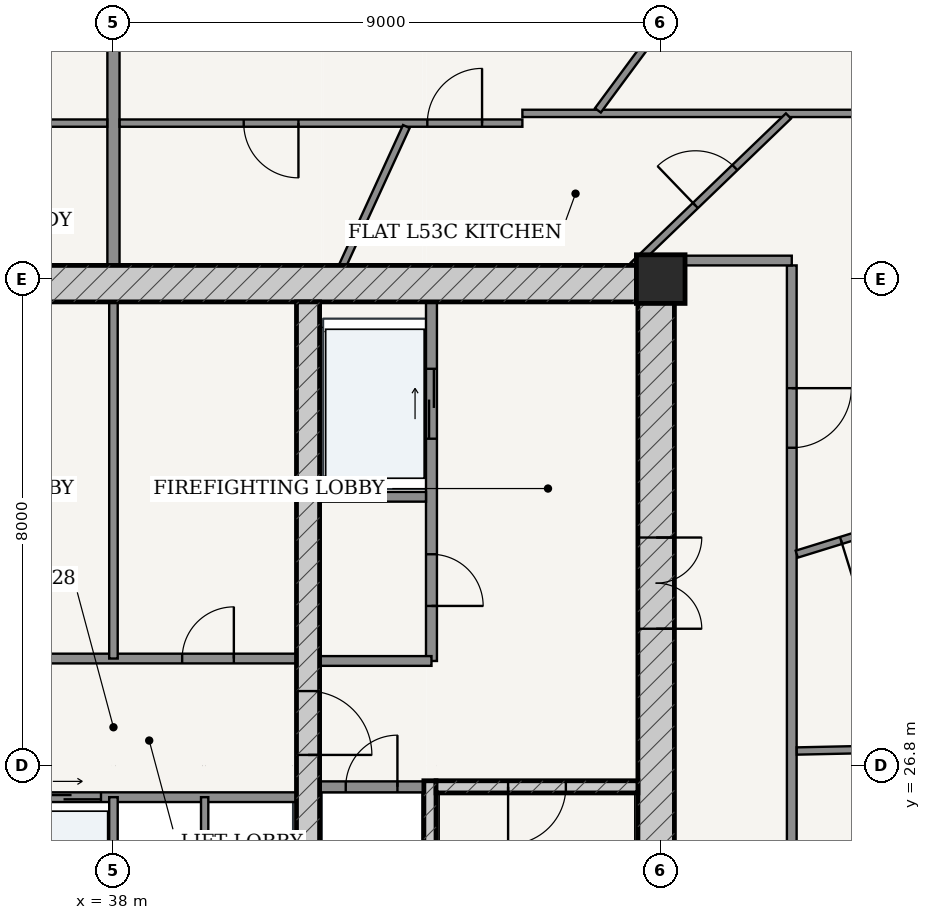
"""IFC4 building model, lengths in metres.
Left out: names, types, materials, properties, quantities, classifications, styles, units other than length and angle.
Written with IfcOpenShell. Run it as: python <this file> out.ifc"""

import sys

from ifc_helpers import new_model, si_unit, direction, frame, frame_2d, origin, origin_2d, place, context, subcontext, project, spatial, rectangle, extrude, source, transform, mapped, element, fill, save


model = new_model("IFC4")
c1 = context("Model", 3, precision=1e-05, world=origin(), true_north=direction((-0.2419218956, 0.970295726276)))
c2 = subcontext(c1, "Body", "Model", "MODEL_VIEW")
j1 = project(units=[si_unit("LENGTHUNIT", "METRE"), si_unit("PLANEANGLEUNIT", "RADIAN")], contexts=[c1])
p1 = place(None, origin())
s1 = spatial("IfcSite", under=j1, at=p1, CompositionType="ELEMENT")
p2 = place(p1, origin())
s2 = spatial("IfcBuilding", under=s1, at=p2, CompositionType="ELEMENT")
p3 = place(p2, frame((0.0, 0.0, 202.3)))
s3 = spatial("IfcBuildingStorey", under=s2, at=p3, CompositionType="ELEMENT", Elevation=202.3)
p4 = place(p3, frame((47.0, 34.8, 0.0), z_axis=(0.0, 0.0, 1.0), x_axis=(1.0, 0.0, 0.0)))
e1 = element("IfcColumn", 1, at=p4, inside=s3, PredefinedType="COLUMN", context=c2, shape_type="SweptSolid", body=[
    extrude(rectangle(XDim=0.8, YDim=0.8, at=origin_2d()), origin(), (0.0, 0.0, 1.0), 3.7),
])
p5 = place(p3, frame((28.775, 34.725, 0.0), z_axis=(0.0, 0.0, 1.0), x_axis=(1.0, 0.0, 0.0)))
e2 = element("IfcWall", 2, at=p5, inside=s3, PredefinedType="SHEAR", context=c2, shape_type="SweptSolid", body=[
    extrude(rectangle(XDim=18.45, YDim=0.6, at=frame_2d((9.225, 0.0))), origin(), (0.0, 0.0, 1.0), 3.435),
])
p6 = place(p3, frame((46.925, 19.175, 0.0), z_axis=(0.0, 0.0, 1.0), x_axis=(0.0, 1.0, 0.0)))
e3 = element("IfcWall", 3, at=p6, inside=s3, PredefinedType="SHEAR", context=c2, shape_type="SweptSolid", body=[
    extrude(rectangle(XDim=15.25, YDim=0.6, at=frame_2d((7.625, 0.0))), origin(), (0.0, 0.0, 1.0), 3.435),
])
p7 = place(p6, frame((9.875, 0.0, 0.0)))
e4 = element("IfcOpeningElement", 4, at=p7, cuts=e3, PredefinedType="OPENING", context=c2, shape_type="SweptSolid", body=[
    extrude(rectangle(XDim=1.5, YDim=2.2, at=frame_2d((0.75, 1.1))), frame((0.0, 0.31, 0.0), z_axis=(0.0, -1.0, 0.0), x_axis=(1.0, 0.0, 0.0)), (0.0, 0.0, 1.0), 0.62),
])
p8 = place(p3, frame((43.205, 19.175, 0.0), z_axis=(0.0, 0.0, 1.0), x_axis=(0.0, 1.0, 0.0)))
e5 = element("IfcWall", 5, at=p8, inside=s3, PredefinedType="SOLIDWALL", context=c2, shape_type="SweptSolid", body=[
    extrude(rectangle(XDim=7.375, YDim=0.2, at=frame_2d((3.688, 0.0))), origin(), (0.0, 0.0, 1.0), 3.435),
])
p9 = place(p3, frame((43.305, 26.45, 0.0), z_axis=(0.0, 0.0, 1.0), x_axis=(1.0, 0.0, 0.0)))
e6 = element("IfcWall", 6, at=p9, inside=s3, PredefinedType="SOLIDWALL", context=c2, shape_type="SweptSolid", body=[
    extrude(rectangle(XDim=3.32, YDim=0.2, at=frame_2d((1.66, 0.0))), origin(), (0.0, 0.0, 1.0), 3.435),
])
p10 = place(p9, frame((1.185, 0.0, 0.0)))
e7 = element("IfcOpeningElement", 7, at=p10, cuts=e6, PredefinedType="OPENING", context=c2, shape_type="SweptSolid", body=[
    extrude(rectangle(XDim=0.95, YDim=2.15, at=frame_2d((0.475, 1.075))), frame((0.0, 0.11, 0.0), z_axis=(0.0, -1.0, 0.0), x_axis=(1.0, 0.0, 0.0)), (0.0, 0.0, 1.0), 0.22),
])
p11 = place(p3, frame((41.2, 19.175, 0.0), z_axis=(0.0, 0.0, 1.0), x_axis=(0.0, 1.0, 0.0)))
e8 = element("IfcWall", 8, at=p11, inside=s3, PredefinedType="SHEAR", context=c2, shape_type="SweptSolid", body=[
    extrude(rectangle(XDim=15.25, YDim=0.38, at=frame_2d((7.625, 0.0))), origin(), (0.0, 0.0, 1.0), 3.435),
])
p12 = place(p11, frame((7.8, 0.0, 0.0)))
e9 = element("IfcOpeningElement", 9, at=p12, cuts=e8, PredefinedType="OPENING", context=c2, shape_type="SweptSolid", body=[
    extrude(rectangle(XDim=1.05, YDim=2.15, at=frame_2d((0.525, 1.075))), frame((0.0, 0.2, 0.0), z_axis=(0.0, -1.0, 0.0), x_axis=(1.0, 0.0, 0.0)), (0.0, 0.0, 1.0), 0.4),
])
p13 = place(p3, frame((41.39, 26.45, 0.0), z_axis=(0.0, 0.0, 1.0), x_axis=(1.0, 0.0, 0.0)))
e10 = element("IfcWall", 10, at=p13, inside=s3, PredefinedType="PARTITIONING", context=c2, shape_type="SweptSolid", body=[
    extrude(rectangle(XDim=1.71, YDim=0.18, at=frame_2d((0.855, 0.0))), origin(), (0.0, 0.0, 1.0), 3.435),
])
p14 = place(p13, frame((0.43, 0.0, 0.0)))
e11 = element("IfcOpeningElement", 11, at=p14, cuts=e10, PredefinedType="OPENING", context=c2, shape_type="SweptSolid", body=[
    extrude(rectangle(XDim=0.85, YDim=2.1, at=frame_2d((0.425, 1.05))), frame((0.0, 0.1, 0.0), z_axis=(0.0, -1.0, 0.0), x_axis=(1.0, 0.0, 0.0)), (0.0, 0.0, 1.0), 0.2),
])
p15 = place(p3, frame((43.23, 28.52, 0.0), z_axis=(0.0, 0.0, 1.0), x_axis=(0.0, 1.0, 0.0)))
e12 = element("IfcWall", 12, at=p15, inside=s3, PredefinedType="PARTITIONING", context=c2, shape_type="SweptSolid", body=[
    extrude(rectangle(XDim=5.905, YDim=0.18, at=frame_2d((2.953, 0.0))), origin(), (0.0, 0.0, 1.0), 3.435),
])
p16 = place(p15, frame((0.905, 0.0, 0.0)))
e13 = element("IfcOpeningElement", 13, at=p16, cuts=e12, PredefinedType="OPENING", context=c2, shape_type="SweptSolid", body=[
    extrude(rectangle(XDim=0.85, YDim=2.1, at=frame_2d((0.425, 1.05))), frame((0.0, 0.1, 0.0), z_axis=(0.0, -1.0, 0.0), x_axis=(1.0, 0.0, 0.0)), (0.0, 0.0, 1.0), 0.2),
])
p17 = place(p15, frame((3.655, 0.0, 0.0)))
e14 = element("IfcOpeningElement", 14, at=p17, cuts=e12, PredefinedType="OPENING", context=c2, shape_type="SweptSolid", body=[
    extrude(rectangle(XDim=1.15, YDim=2.2, at=frame_2d((0.575, 1.1))), frame((0.0, 0.1, 0.0), z_axis=(0.0, -1.0, 0.0), x_axis=(1.0, 0.0, 0.0)), (0.0, 0.0, 1.0), 0.2),
])
p18 = place(p3, frame((41.39, 31.22, 0.0), z_axis=(0.0, 0.0, 1.0), x_axis=(1.0, 0.0, 0.0)))
e15 = element("IfcWall", 15, at=p18, inside=s3, PredefinedType="PARTITIONING", context=c2, shape_type="SweptSolid", body=[
    extrude(rectangle(XDim=1.75, YDim=0.16, at=frame_2d((0.875, 0.0))), origin(), (0.0, 0.0, 1.0), 3.435),
])
p19 = place(p3, frame((41.39, 28.52, 0.0), z_axis=(0.0, 0.0, 1.0), x_axis=(1.0, 0.0, 0.0)))
e16 = element("IfcWall", 16, at=p19, inside=s3, PredefinedType="PARTITIONING", context=c2, shape_type="SweptSolid", body=[
    extrude(rectangle(XDim=1.84, YDim=0.16, at=frame_2d((0.92, 0.0))), origin(), (0.0, 0.0, 1.0), 3.435),
])
p20 = place(p3, frame((34.99, 28.56, 0.0), z_axis=(0.0, 0.0, 1.0), x_axis=(1.0, 0.0, 0.0)))
e17 = element("IfcWall", 17, at=p20, inside=s3, PredefinedType="PARTITIONING", context=c2, shape_type="SweptSolid", body=[
    extrude(rectangle(XDim=6.02, YDim=0.16, at=frame_2d((3.01, 0.0))), origin(), (0.0, 0.0, 1.0), 3.435),
])
p21 = place(p20, frame((1.025, 0.0, 0.0)))
e18 = element("IfcOpeningElement", 18, at=p21, cuts=e17, PredefinedType="OPENING", context=c2, shape_type="SweptSolid", body=[
    extrude(rectangle(XDim=0.86, YDim=2.1, at=frame_2d((0.43, 1.05))), frame((0.0, 0.09, 0.0), z_axis=(0.0, -1.0, 0.0), x_axis=(1.0, 0.0, 0.0)), (0.0, 0.0, 1.0), 0.18),
])
p22 = place(p20, frame((4.14, 0.0, 0.0)))
e19 = element("IfcOpeningElement", 19, at=p22, cuts=e17, PredefinedType="OPENING", context=c2, shape_type="SweptSolid", body=[
    extrude(rectangle(XDim=0.85, YDim=2.1, at=frame_2d((0.425, 1.05))), frame((0.0, 0.09, 0.0), z_axis=(0.0, -1.0, 0.0), x_axis=(1.0, 0.0, 0.0)), (0.0, 0.0, 1.0), 0.18),
])
p23 = place(p3, frame((38.0, 28.56, 0.0), z_axis=(0.0, 0.0, 1.0), x_axis=(0.0, 1.0, 0.0)))
e20 = element("IfcWall", 20, at=p23, inside=s3, PredefinedType="PARTITIONING", context=c2, shape_type="SweptSolid", body=[
    extrude(rectangle(XDim=5.865, YDim=0.14, at=frame_2d((2.933, 0.0))), origin(), (0.0, 0.0, 1.0), 3.435),
])
p24 = place(p3, frame((34.99, 26.28, 0.0), z_axis=(0.0, 0.0, 1.0), x_axis=(1.0, 0.0, 0.0)))
e21 = element("IfcWall", 21, at=p24, inside=s3, PredefinedType="PARTITIONING", context=c2, shape_type="SweptSolid", body=[
    extrude(rectangle(XDim=6.02, YDim=0.16, at=frame_2d((3.01, 0.0))), origin(), (0.0, 0.0, 1.0), 3.435),
])
p25 = place(p24, frame((0.225, 0.0, 0.0)))
e22 = element("IfcOpeningElement", 22, at=p25, cuts=e21, PredefinedType="OPENING", context=c2, shape_type="SweptSolid", body=[
    extrude(rectangle(XDim=1.1, YDim=2.2, at=frame_2d((0.55, 1.1))), frame((0.0, 0.09, 0.0), z_axis=(0.0, -1.0, 0.0), x_axis=(1.0, 0.0, 0.0)), (0.0, 0.0, 1.0), 0.18),
])
p26 = place(p24, frame((1.705, 0.0, 0.0)))
e23 = element("IfcOpeningElement", 23, at=p26, cuts=e21, PredefinedType="OPENING", context=c2, shape_type="SweptSolid", body=[
    extrude(rectangle(XDim=1.1, YDim=2.2, at=frame_2d((0.55, 1.1))), frame((0.0, 0.09, 0.0), z_axis=(0.0, -1.0, 0.0), x_axis=(1.0, 0.0, 0.0)), (0.0, 0.0, 1.0), 0.18),
])
p27 = place(p3, frame((38.0, 23.72, 0.0), z_axis=(0.0, 0.0, 1.0), x_axis=(0.0, 1.0, 0.0)))
e24 = element("IfcWall", 24, at=p27, inside=s3, PredefinedType="PARTITIONING", context=c2, shape_type="SweptSolid", body=[
    extrude(rectangle(XDim=2.56, YDim=0.14, at=frame_2d((1.28, 0.0))), origin(), (0.0, 0.0, 1.0), 3.435),
])
p28 = place(p3, frame((39.5, 23.72, 0.0), z_axis=(0.0, 0.0, 1.0), x_axis=(0.0, 1.0, 0.0)))
e25 = element("IfcWall", 25, at=p28, inside=s3, PredefinedType="PARTITIONING", context=c2, shape_type="SweptSolid", body=[
    extrude(rectangle(XDim=2.56, YDim=0.12, at=frame_2d((1.28, 0.0))), origin(), (0.0, 0.0, 1.0), 3.435),
])
p29 = place(p3, frame((49.155, 16.725, 0.0), z_axis=(0.0, 0.0, 1.0), x_axis=(0.0, 1.0, 0.0)))
e26 = element("IfcWall", 26, at=p29, inside=s3, PredefinedType="PARTITIONING", context=c2, shape_type="SweptSolid", body=[
    extrude(rectangle(XDim=18.3, YDim=0.16, at=frame_2d((9.15, 0.0))), origin(), (0.0, 0.0, 1.0), 2.951),
])
p30 = place(p29, frame((15.302, 0.0, 0.0)))
e27 = element("IfcOpeningElement", 27, at=p30, cuts=e26, PredefinedType="OPENING", context=c2, shape_type="SweptSolid", body=[
    extrude(rectangle(XDim=0.98, YDim=2.2, at=frame_2d((0.49, 1.1))), frame((0.0, 0.09, 0.0), z_axis=(0.0, -1.0, 0.0), x_axis=(1.0, 0.0, 0.0)), (0.0, 0.0, 1.0), 0.18),
])
p31 = place(p3, frame((47.225, 35.105, 0.0), z_axis=(0.0, 0.0, 1.0), x_axis=(1.0, 0.0, 0.0)))
e28 = element("IfcWall", 28, at=p31, inside=s3, PredefinedType="PARTITIONING", context=c2, shape_type="SweptSolid", body=[
    extrude(rectangle(XDim=1.93, YDim=0.16, at=frame_2d((0.965, 0.0))), origin(), (0.0, 0.0, 1.0), 3.435),
])
p32 = place(p3, frame((38.0, 35.027, 0.0), z_axis=(0.0, 0.0, 1.0), x_axis=(0.0, 1.0, 0.0)))
e29 = element("IfcWall", 29, at=p32, inside=s3, PredefinedType="PARTITIONING", context=c2, shape_type="SweptSolid", body=[
    extrude(rectangle(XDim=11.413, YDim=0.2, at=frame_2d((5.707, 0.0))), origin(), (0.0, 0.0, 1.0), 2.52),
])
p33 = place(p3, frame((31.275, 37.365, 0.0), z_axis=(0.0, 0.0, 1.0), x_axis=(1.0, 0.0, 0.0)))
e30 = element("IfcWall", 30, at=p33, inside=s3, PredefinedType="PARTITIONING", context=c2, shape_type="SweptSolid", body=[
    extrude(rectangle(XDim=6.623, YDim=0.12, at=frame_2d((3.312, 0.0))), origin(), (0.0, 0.0, 1.0), 2.951),
])
p34 = place(p33, frame((4.413, 0.0, 0.0)))
e31 = element("IfcOpeningElement", 31, at=p34, cuts=e30, PredefinedType="OPENING", context=c2, shape_type="SweptSolid", body=[
    extrude(rectangle(XDim=0.86, YDim=2.15, at=frame_2d((0.43, 1.075))), frame((0.0, 0.07, 0.0), z_axis=(0.0, -1.0, 0.0), x_axis=(1.0, 0.0, 0.0)), (0.0, 0.0, 1.0), 0.14),
])
p35 = place(p33, frame((1.328, 0.0, 0.0)))
e32 = element("IfcOpeningElement", 32, at=p35, cuts=e30, PredefinedType="OPENING", context=c2, shape_type="SweptSolid", body=[
    extrude(rectangle(XDim=0.9, YDim=2.15, at=frame_2d((0.45, 1.075))), frame((0.0, 0.07, 0.0), z_axis=(0.0, -1.0, 0.0), x_axis=(1.0, 0.0, 0.0)), (0.0, 0.0, 1.0), 0.14),
])
p36 = place(p3, frame((38.102, 37.365, 0.0), z_axis=(0.0, 0.0, 1.0), x_axis=(1.0, 0.0, 0.0)))
e33 = element("IfcWall", 33, at=p36, inside=s3, PredefinedType="PARTITIONING", context=c2, shape_type="SweptSolid", body=[
    extrude(rectangle(XDim=6.623, YDim=0.12, at=frame_2d((3.312, 0.0))), origin(), (0.0, 0.0, 1.0), 2.951),
])
p37 = place(p36, frame((5.06, 0.0, 0.0)))
e34 = element("IfcOpeningElement", 34, at=p37, cuts=e33, PredefinedType="OPENING", context=c2, shape_type="SweptSolid", body=[
    extrude(rectangle(XDim=0.9, YDim=2.15, at=frame_2d((0.45, 1.075))), frame((0.0, 0.07, 0.0), z_axis=(0.0, -1.0, 0.0), x_axis=(1.0, 0.0, 0.0)), (0.0, 0.0, 1.0), 0.14),
])
p38 = place(p36, frame((2.04, 0.0, 0.0)))
e35 = element("IfcOpeningElement", 35, at=p38, cuts=e33, PredefinedType="OPENING", context=c2, shape_type="SweptSolid", body=[
    extrude(rectangle(XDim=0.9, YDim=2.15, at=frame_2d((0.45, 1.075))), frame((0.0, 0.07, 0.0), z_axis=(0.0, -1.0, 0.0), x_axis=(1.0, 0.0, 0.0)), (0.0, 0.0, 1.0), 0.14),
])
p39 = place(p3, frame((44.725, 37.525, 0.0), z_axis=(0.0, 0.0, 1.0), x_axis=(1.0, 0.0, 0.0)))
e36 = element("IfcWall", 36, at=p39, inside=s3, PredefinedType="PARTITIONING", context=c2, shape_type="SweptSolid", body=[
    extrude(rectangle(XDim=6.85, YDim=0.12, at=frame_2d((3.425, 0.0))), origin(), (0.0, 0.0, 1.0), 2.951),
])
p40 = place(p3, frame((45.967, 37.575, 0.0), z_axis=(0.0, 0.0, 1.0), x_axis=(0.59452500855, 0.804077119565, 0.0)))
e37 = element("IfcWall", 37, at=p40, inside=s3, PredefinedType="PARTITIONING", context=c2, shape_type="SweptSolid", body=[
    extrude(rectangle(XDim=6.867, YDim=0.12, at=frame_2d((3.434, 0.0))), origin(), (0.0, 0.0, 1.0), 2.951),
])
p41 = place(p40, frame((1.975, 0.0, 0.0)))
e38 = element("IfcOpeningElement", 38, at=p41, cuts=e37, PredefinedType="OPENING", context=c2, shape_type="SweptSolid", body=[
    extrude(rectangle(XDim=0.9, YDim=2.15, at=frame_2d((0.45, 1.075))), frame((0.0, 0.07, 0.0), z_axis=(0.0, -1.0, 0.0), x_axis=(1.0, 0.0, 0.0)), (0.0, 0.0, 1.0), 0.14),
])
p42 = place(p3, frame((49.237, 27.039, 0.0), z_axis=(0.0, 0.0, 1.0), x_axis=(0.999772223164, 0.021342487922, 0.0)))
e39 = element("IfcWall", 39, at=p42, inside=s3, PredefinedType="PARTITIONING", context=c2, shape_type="SweptSolid", body=[
    extrude(rectangle(XDim=2.276, YDim=0.12, at=frame_2d((1.138, 0.0))), origin(), (0.0, 0.0, 1.0), 3.435),
])
p43 = place(p3, frame((49.237, 30.277, 0.0), z_axis=(0.0, 0.0, 1.0), x_axis=(0.955326488692, 0.295552533406, 0.0)))
e40 = element("IfcWall", 40, at=p43, inside=s3, PredefinedType="PARTITIONING", context=c2, shape_type="SweptSolid", body=[
    extrude(rectangle(XDim=2.386, YDim=0.12, at=frame_2d((1.193, 0.0))), origin(), (0.0, 0.0, 1.0), 3.435),
])
p44 = place(p43, frame((0.763, 0.0, 0.0)))
e41 = element("IfcOpeningElement", 41, at=p44, cuts=e40, PredefinedType="OPENING", context=c2, shape_type="SweptSolid", body=[
    extrude(rectangle(XDim=0.86, YDim=2.15, at=frame_2d((0.43, 1.075))), frame((0.0, 0.07, 0.0), z_axis=(0.0, -1.0, 0.0), x_axis=(1.0, 0.0, 0.0)), (0.0, 0.0, 1.0), 0.14),
])
p45 = place(p3, frame((46.549, 35.026, 0.0), z_axis=(0.0, 0.0, 1.0), x_axis=(0.720557461206, 0.693395230082, 0.0)))
e42 = element("IfcWall", 42, at=p45, inside=s3, PredefinedType="PARTITIONING", context=c2, shape_type="SweptSolid", body=[
    extrude(rectangle(XDim=3.541, YDim=0.12, at=frame_2d((1.771, 0.0))), origin(), (0.0, 0.0, 1.0), 2.951),
])
p46 = place(p45, frame((1.419, 0.0, 0.0)))
e43 = element("IfcOpeningElement", 43, at=p46, cuts=e42, PredefinedType="OPENING", context=c2, shape_type="SweptSolid", body=[
    extrude(rectangle(XDim=0.9, YDim=2.15, at=frame_2d((0.45, 1.075))), frame((0.0, 0.07, 0.0), z_axis=(0.0, -1.0, 0.0), x_axis=(1.0, 0.0, 0.0)), (0.0, 0.0, 1.0), 0.14),
])
p47 = place(p3, frame((41.771, 35.027, 0.0), z_axis=(0.0, 0.0, 1.0), x_axis=(0.416688202143, 0.909049471808, 0.0)))
e44 = element("IfcWall", 44, at=p47, inside=s3, PredefinedType="PARTITIONING", context=c2, shape_type="SweptSolid", body=[
    extrude(rectangle(XDim=2.51, YDim=0.12, at=frame_2d((1.255, 0.0))), origin(), (0.0, 0.0, 1.0), 3.435),
])
m1 = source(origin(), c2, "Body", "SweptSolid", [
    extrude(rectangle(XDim=1.5, YDim=2.2, at=frame_2d((0.75, 1.1))), frame((0.0, 0.025, 0.0), z_axis=(0.0, -1.0, 0.0), x_axis=(1.0, 0.0, 0.0)), (0.0, 0.0, 1.0), 0.05),
])
p48 = place(p7, frame((1.5, 0.0, 0.0), z_axis=(0.0, 0.0, 1.0), x_axis=(-1.0, 0.0, 0.0)))
e45 = element("IfcDoor", 45, at=p48, inside=s3, OperationType="DOUBLE_DOOR_SINGLE_SWING", PredefinedType="DOOR", context=c2, shape_type="MappedRepresentation", body=[
    mapped(m1, transform((0.0, 0.0, 0.0), scale=1.0)),
])
fill(e4, e45)
m2 = source(origin(), c2, "Body", "SweptSolid", [
    extrude(rectangle(XDim=1.05, YDim=2.15, at=frame_2d((0.525, 1.075))), frame((0.0, 0.025, 0.0), z_axis=(0.0, -1.0, 0.0), x_axis=(1.0, 0.0, 0.0)), (0.0, 0.0, 1.0), 0.05),
])
p49 = place(p12, frame((1.05, 0.0, 0.0), z_axis=(0.0, 0.0, 1.0), x_axis=(-1.0, 0.0, 0.0)))
e46 = element("IfcDoor", 46, at=p49, inside=s3, OperationType="SINGLE_SWING_RIGHT", PredefinedType="DOOR", context=c2, shape_type="MappedRepresentation", body=[
    mapped(m2, transform((0.0, 0.0, 0.0), scale=1.0)),
])
fill(e9, e46)
m3 = source(origin(), c2, "Body", "SweptSolid", [
    extrude(rectangle(XDim=0.95, YDim=2.15, at=frame_2d((0.475, 1.075))), frame((0.0, 0.025, 0.0), z_axis=(0.0, -1.0, 0.0), x_axis=(1.0, 0.0, 0.0)), (0.0, 0.0, 1.0), 0.05),
])
p50 = place(p10, frame((0.95, 0.0, 0.0), z_axis=(0.0, 0.0, 1.0), x_axis=(-1.0, 0.0, 0.0)))
e47 = element("IfcDoor", 47, at=p50, inside=s3, OperationType="SINGLE_SWING_RIGHT", PredefinedType="DOOR", context=c2, shape_type="MappedRepresentation", body=[
    mapped(m3, transform((0.0, 0.0, 0.0), scale=1.0)),
])
fill(e7, e47)
m4 = source(origin(), c2, "Body", "SweptSolid", [
    extrude(rectangle(XDim=0.85, YDim=2.1, at=frame_2d((0.425, 1.05))), frame((0.0, 0.025, 0.0), z_axis=(0.0, -1.0, 0.0), x_axis=(1.0, 0.0, 0.0)), (0.0, 0.0, 1.0), 0.05),
])
p51 = place(p14, origin())
e48 = element("IfcDoor", 48, at=p51, inside=s3, OperationType="SINGLE_SWING_RIGHT", PredefinedType="DOOR", context=c2, shape_type="MappedRepresentation", body=[
    mapped(m4, transform((0.0, 0.0, 0.0), scale=1.0)),
])
fill(e11, e48)
p52 = place(p16, frame((0.85, 0.0, 0.0), z_axis=(0.0, 0.0, 1.0), x_axis=(-1.0, 0.0, 0.0)))
e49 = element("IfcDoor", 49, at=p52, inside=s3, OperationType="SINGLE_SWING_RIGHT", PredefinedType="DOOR", context=c2, shape_type="MappedRepresentation", body=[
    mapped(m4, transform((0.0, 0.0, 0.0), scale=1.0)),
])
fill(e13, e49)
p53 = place(p22, origin())
e50 = element("IfcDoor", 50, at=p53, inside=s3, OperationType="SINGLE_SWING_RIGHT", PredefinedType="DOOR", context=c2, shape_type="MappedRepresentation", body=[
    mapped(m4, transform((0.0, 0.0, 0.0), scale=1.0)),
])
fill(e19, e50)
m5 = source(origin(), c2, "Body", "SweptSolid", [
    extrude(rectangle(XDim=1.15, YDim=2.2, at=frame_2d((0.575, 1.1))), frame((0.0, 0.025, 0.0), z_axis=(0.0, -1.0, 0.0), x_axis=(1.0, 0.0, 0.0)), (0.0, 0.0, 1.0), 0.05),
])
p54 = place(p17, origin())
e51 = element("IfcDoor", 51, at=p54, inside=s3, OperationType="DOUBLE_DOOR_SLIDING", PredefinedType="DOOR", context=c2, shape_type="MappedRepresentation", body=[
    mapped(m5, transform((0.0, 0.0, 0.0), scale=1.0)),
])
fill(e14, e51)
m6 = source(origin(), c2, "Body", "SweptSolid", [
    extrude(rectangle(XDim=1.1, YDim=2.2, at=frame_2d((0.55, 1.1))), frame((0.0, 0.025, 0.0), z_axis=(0.0, -1.0, 0.0), x_axis=(1.0, 0.0, 0.0)), (0.0, 0.0, 1.0), 0.05),
])
p55 = place(p26, origin())
e52 = element("IfcDoor", 52, at=p55, inside=s3, OperationType="DOUBLE_DOOR_SLIDING", PredefinedType="DOOR", context=c2, shape_type="MappedRepresentation", body=[
    mapped(m6, transform((0.0, 0.0, 0.0), scale=1.0)),
])
fill(e23, e52)
m7 = source(origin(), c2, "Body", "SweptSolid", [
    extrude(rectangle(XDim=0.98, YDim=2.2, at=frame_2d((0.49, 1.1))), frame((0.0, 0.025, 0.0), z_axis=(0.0, -1.0, 0.0), x_axis=(1.0, 0.0, 0.0)), (0.0, 0.0, 1.0), 0.05),
])
p56 = place(p30, frame((0.98, 0.0, 0.0), z_axis=(0.0, 0.0, 1.0), x_axis=(-1.0, 0.0, 0.0)))
e53 = element("IfcDoor", 53, at=p56, inside=s3, OperationType="SINGLE_SWING_LEFT", PredefinedType="DOOR", context=c2, shape_type="MappedRepresentation", body=[
    mapped(m7, transform((0.0, 0.0, 0.0), scale=1.0)),
])
fill(e27, e53)
m8 = source(origin(), c2, "Body", "SweptSolid", [
    extrude(rectangle(XDim=0.86, YDim=2.15, at=frame_2d((0.43, 1.075))), frame((0.0, 0.025, 0.0), z_axis=(0.0, -1.0, 0.0), x_axis=(1.0, 0.0, 0.0)), (0.0, 0.0, 1.0), 0.05),
])
p57 = place(p44, frame((0.86, 0.0, 0.0), z_axis=(0.0, 0.0, 1.0), x_axis=(-1.0, 0.0, 0.0)))
e54 = element("IfcDoor", 54, at=p57, inside=s3, OperationType="SINGLE_SWING_RIGHT", PredefinedType="DOOR", context=c2, shape_type="MappedRepresentation", body=[
    mapped(m8, transform((0.0, 0.0, 0.0), scale=1.0)),
])
fill(e41, e54)
m9 = source(origin(), c2, "Body", "SweptSolid", [
    extrude(rectangle(XDim=0.9, YDim=2.15, at=frame_2d((0.45, 1.075))), frame((0.0, 0.025, 0.0), z_axis=(0.0, -1.0, 0.0), x_axis=(1.0, 0.0, 0.0)), (0.0, 0.0, 1.0), 0.05),
])
p58 = place(p46, origin())
e55 = element("IfcDoor", 55, at=p58, inside=s3, OperationType="SINGLE_SWING_LEFT", PredefinedType="DOOR", context=c2, shape_type="MappedRepresentation", body=[
    mapped(m9, transform((0.0, 0.0, 0.0), scale=1.0)),
])
fill(e43, e55)
p59 = place(p37, origin())
e56 = element("IfcDoor", 56, at=p59, inside=s3, OperationType="SINGLE_SWING_RIGHT", PredefinedType="DOOR", context=c2, shape_type="MappedRepresentation", body=[
    mapped(m9, transform((0.0, 0.0, 0.0), scale=1.0)),
])
fill(e34, e56)
p60 = place(p38, frame((0.9, 0.0, 0.0), z_axis=(0.0, 0.0, 1.0), x_axis=(-1.0, 0.0, 0.0)))
e57 = element("IfcDoor", 57, at=p60, inside=s3, OperationType="SINGLE_SWING_LEFT", PredefinedType="DOOR", context=c2, shape_type="MappedRepresentation", body=[
    mapped(m9, transform((0.0, 0.0, 0.0), scale=1.0)),
])
fill(e35, e57)
save(model, sys.argv[1])
